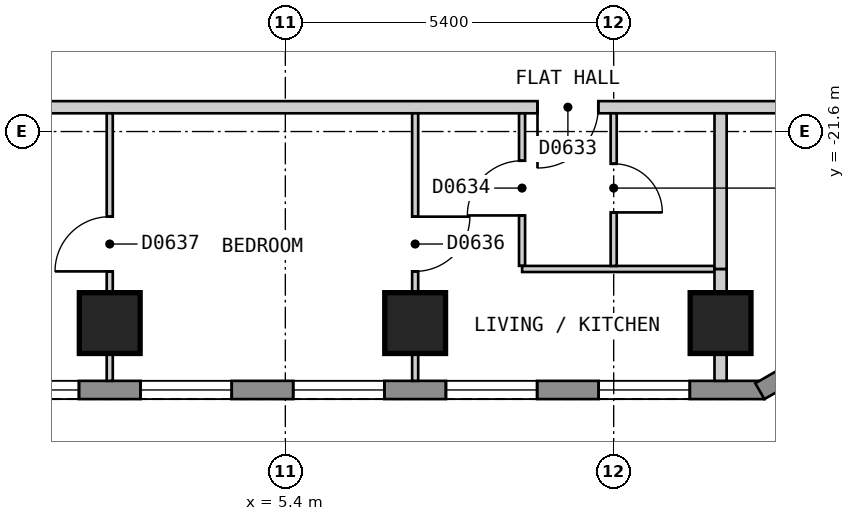
"""IFC4 building model, lengths in metres.
Left out: names, types, materials, properties, quantities, classifications, styles, units other than length and angle.
Written with IfcOpenShell. Run it as: python <this file> out.ifc"""

import sys

from ifc_helpers import new_model, si_unit, direction, frame, frame_2d, origin, origin_2d, place, context, subcontext, project, spatial, polyline, rectangle, outline, extrude, element, fill, save


model = new_model("IFC4")
c1 = context("Model", 3, precision=1e-05, world=origin(), true_north=direction((0.0, 1.0)))
c2 = subcontext(c1, "Body", "Model", "MODEL_VIEW")
j1 = project(units=[si_unit("LENGTHUNIT", "METRE"), si_unit("PLANEANGLEUNIT", "RADIAN")], contexts=[c1])
p1 = place(None, origin())
s1 = spatial("IfcSite", under=j1, at=p1, CompositionType="ELEMENT")
p2 = place(p1, origin())
s2 = spatial("IfcBuilding", under=s1, at=p2, CompositionType="ELEMENT")
p3 = place(p2, frame((0.0, 0.0, 81.0)))
s3 = spatial("IfcBuildingStorey", under=s2, at=p3, CompositionType="ELEMENT", Elevation=81.0)
for number, where, z_axis, x_axis in (
    (1, (2.512, -24.75, 0.0), (0.0, 0.0, 1.0), (1.0, 0.0, 0.0)),
    (2, (7.535, -24.75, 0.0), (0.0, 0.0, 1.0), (1.0, 0.0, 0.0)),
    (3, (12.558, -24.75, 0.0), (0.0, 0.0, 1.0), (1.0, 0.0, 0.0)),
):
    element("IfcColumn", number, at=place(p3, frame(where, z_axis=z_axis, x_axis=x_axis)), inside=s3, PredefinedType="COLUMN", context=c2, shape_type="SweptSolid", body=[
        extrude(rectangle(XDim=1.0, YDim=1.0, at=origin_2d()), origin(), (0.0, 0.0, 1.0), 3.0),
    ])
p4 = place(p3, frame((-13.279, -25.85, 0.0), z_axis=(0.0, 0.0, 1.0), x_axis=(1.0, 0.0, 0.0)))
e4 = element("IfcWall", 4, at=p4, inside=s3, PredefinedType="SOLIDWALL", context=c2, shape_type="SweptSolid", body=[
    extrude(outline(polyline([(0.0, -0.15), (26.558, -0.15), (26.478, 0.15), (0.08, 0.15), (0.0, -0.15)])), origin(), (0.0, 0.0, 1.0), 2.7),
])
p5 = place(p4, frame((1.228, 0.0, 0.15)))
e5 = element("IfcOpeningElement", 5, at=p5, cuts=e4, PredefinedType="OPENING", context=c2, shape_type="SweptSolid", body=[
    extrude(rectangle(XDim=1.5, YDim=2.1, at=frame_2d((0.75, 1.05))), frame((0.0, 0.16, 0.0), z_axis=(0.0, -1.0, 0.0), x_axis=(1.0, 0.0, 0.0)), (0.0, 0.0, 1.0), 0.32),
])
p6 = place(p4, frame((3.739, 0.0, 0.15)))
e6 = element("IfcOpeningElement", 6, at=p6, cuts=e4, PredefinedType="OPENING", context=c2, shape_type="SweptSolid", body=[
    extrude(rectangle(XDim=1.5, YDim=2.1, at=frame_2d((0.75, 1.05))), frame((0.0, 0.16, 0.0), z_axis=(0.0, -1.0, 0.0), x_axis=(1.0, 0.0, 0.0)), (0.0, 0.0, 1.0), 0.32),
])
p7 = place(p4, frame((6.251, 0.0, 0.15)))
e7 = element("IfcOpeningElement", 7, at=p7, cuts=e4, PredefinedType="OPENING", context=c2, shape_type="SweptSolid", body=[
    extrude(rectangle(XDim=1.5, YDim=2.1, at=frame_2d((0.75, 1.05))), frame((0.0, 0.16, 0.0), z_axis=(0.0, -1.0, 0.0), x_axis=(1.0, 0.0, 0.0)), (0.0, 0.0, 1.0), 0.32),
])
p8 = place(p4, frame((8.762, 0.0, 0.15)))
e8 = element("IfcOpeningElement", 8, at=p8, cuts=e4, PredefinedType="OPENING", context=c2, shape_type="SweptSolid", body=[
    extrude(rectangle(XDim=1.5, YDim=2.1, at=frame_2d((0.75, 1.05))), frame((0.0, 0.16, 0.0), z_axis=(0.0, -1.0, 0.0), x_axis=(1.0, 0.0, 0.0)), (0.0, 0.0, 1.0), 0.32),
])
p9 = place(p4, frame((11.274, 0.0, 0.15)))
e9 = element("IfcOpeningElement", 9, at=p9, cuts=e4, PredefinedType="OPENING", context=c2, shape_type="SweptSolid", body=[
    extrude(rectangle(XDim=1.5, YDim=2.1, at=frame_2d((0.75, 1.05))), frame((0.0, 0.16, 0.0), z_axis=(0.0, -1.0, 0.0), x_axis=(1.0, 0.0, 0.0)), (0.0, 0.0, 1.0), 0.32),
])
p10 = place(p4, frame((13.785, 0.0, 0.15)))
e10 = element("IfcOpeningElement", 10, at=p10, cuts=e4, PredefinedType="OPENING", context=c2, shape_type="SweptSolid", body=[
    extrude(rectangle(XDim=1.5, YDim=2.1, at=frame_2d((0.75, 1.05))), frame((0.0, 0.16, 0.0), z_axis=(0.0, -1.0, 0.0), x_axis=(1.0, 0.0, 0.0)), (0.0, 0.0, 1.0), 0.32),
])
p11 = place(p4, frame((16.297, 0.0, 0.15)))
e11 = element("IfcOpeningElement", 11, at=p11, cuts=e4, PredefinedType="OPENING", context=c2, shape_type="SweptSolid", body=[
    extrude(rectangle(XDim=1.5, YDim=2.1, at=frame_2d((0.75, 1.05))), frame((0.0, 0.16, 0.0), z_axis=(0.0, -1.0, 0.0), x_axis=(1.0, 0.0, 0.0)), (0.0, 0.0, 1.0), 0.32),
])
p12 = place(p4, frame((18.808, 0.0, 0.15)))
e12 = element("IfcOpeningElement", 12, at=p12, cuts=e4, PredefinedType="OPENING", context=c2, shape_type="SweptSolid", body=[
    extrude(rectangle(XDim=1.5, YDim=2.1, at=frame_2d((0.75, 1.05))), frame((0.0, 0.16, 0.0), z_axis=(0.0, -1.0, 0.0), x_axis=(1.0, 0.0, 0.0)), (0.0, 0.0, 1.0), 0.32),
])
p13 = place(p4, frame((21.32, 0.0, 0.15)))
e13 = element("IfcOpeningElement", 13, at=p13, cuts=e4, PredefinedType="OPENING", context=c2, shape_type="SweptSolid", body=[
    extrude(rectangle(XDim=1.5, YDim=2.1, at=frame_2d((0.75, 1.05))), frame((0.0, 0.16, 0.0), z_axis=(0.0, -1.0, 0.0), x_axis=(1.0, 0.0, 0.0)), (0.0, 0.0, 1.0), 0.32),
])
p14 = place(p4, frame((23.831, 0.0, 0.15)))
e14 = element("IfcOpeningElement", 14, at=p14, cuts=e4, PredefinedType="OPENING", context=c2, shape_type="SweptSolid", body=[
    extrude(rectangle(XDim=1.5, YDim=2.1, at=frame_2d((0.75, 1.05))), frame((0.0, 0.16, 0.0), z_axis=(0.0, -1.0, 0.0), x_axis=(1.0, 0.0, 0.0)), (0.0, 0.0, 1.0), 0.32),
])
p15 = place(p3, frame((13.204, -25.87, 0.0), z_axis=(0.0, 0.0, 1.0), x_axis=(0.866010750942, 0.50002537861, 0.0)))
e15 = element("IfcWall", 15, at=p15, inside=s3, PredefinedType="SOLIDWALL", context=c2, shape_type="SweptSolid", body=[
    extrude(outline(polyline([(0.0, -0.15), (5.0, -0.15), (4.919, 0.15), (0.08, 0.15), (0.0, -0.15)])), origin(), (0.0, 0.0, 1.0), 2.7),
])
p16 = place(p15, frame((0.65, 0.0, 0.15)))
e16 = element("IfcOpeningElement", 16, at=p16, cuts=e15, PredefinedType="OPENING", context=c2, shape_type="SweptSolid", body=[
    extrude(rectangle(XDim=1.2, YDim=2.1, at=frame_2d((0.6, 1.05))), frame((0.0, 0.16, 0.0), z_axis=(0.0, -1.0, 0.0), x_axis=(1.0, 0.0, 0.0)), (0.0, 0.0, 1.0), 0.32),
])
p17 = place(p15, frame((3.149, 0.0, 0.15)))
e17 = element("IfcOpeningElement", 17, at=p17, cuts=e15, PredefinedType="OPENING", context=c2, shape_type="SweptSolid", body=[
    extrude(rectangle(XDim=1.2, YDim=2.1, at=frame_2d((0.6, 1.05))), frame((0.0, 0.16, 0.0), z_axis=(0.0, -1.0, 0.0), x_axis=(1.0, 0.0, 0.0)), (0.0, 0.0, 1.0), 0.32),
])
p18 = place(p3, frame((-15.499, -21.2, 0.0), z_axis=(0.0, 0.0, 1.0), x_axis=(1.0, 0.0, 0.0)))
e18 = element("IfcWall", 18, at=p18, inside=s3, PredefinedType="PARTITIONING", context=c2, shape_type="SweptSolid", body=[
    extrude(rectangle(XDim=30.898, YDim=0.2, at=frame_2d((15.449, 0.0))), origin(), (0.0, 0.0, 1.0), 2.7),
])
p19 = place(p18, frame((4.954, 0.0, 0.0)))
e19 = element("IfcOpeningElement", 19, at=p19, cuts=e18, PredefinedType="OPENING", context=c2, shape_type="SweptSolid", body=[
    extrude(rectangle(XDim=1.0, YDim=2.1, at=frame_2d((0.5, 1.05))), frame((0.0, 0.11, 0.0), z_axis=(0.0, -1.0, 0.0), x_axis=(1.0, 0.0, 0.0)), (0.0, 0.0, 1.0), 0.22),
])
p20 = place(p18, frame((25.046, 0.0, 0.0)))
e20 = element("IfcOpeningElement", 20, at=p20, cuts=e18, PredefinedType="OPENING", context=c2, shape_type="SweptSolid", body=[
    extrude(rectangle(XDim=1.0, YDim=2.1, at=frame_2d((0.5, 1.05))), frame((0.0, 0.11, 0.0), z_axis=(0.0, -1.0, 0.0), x_axis=(1.0, 0.0, 0.0)), (0.0, 0.0, 1.0), 0.22),
])
p21 = place(p3, frame((9.293, -21.3, 0.0), z_axis=(0.0, 0.0, 1.0), x_axis=(0.0, -1.0, 0.0)))
e21 = element("IfcWall", 21, at=p21, inside=s3, PredefinedType="PARTITIONING", context=c2, shape_type="SweptSolid", body=[
    extrude(rectangle(XDim=2.509, YDim=0.1, at=frame_2d((1.254, 0.0))), origin(), (0.0, 0.0, 1.0), 2.7),
])
p22 = place(p21, frame((0.78, 0.0, 0.0)))
e22 = element("IfcOpeningElement", 22, at=p22, cuts=e21, PredefinedType="OPENING", context=c2, shape_type="SweptSolid", body=[
    extrude(rectangle(XDim=0.9, YDim=2.1, at=frame_2d((0.45, 1.05))), frame((0.0, 0.06, 0.0), z_axis=(0.0, -1.0, 0.0), x_axis=(1.0, 0.0, 0.0)), (0.0, 0.0, 1.0), 0.12),
])
p23 = place(p3, frame((9.294, -23.86, 0.0), z_axis=(0.0, 0.0, 1.0), x_axis=(1.0, 0.0, 0.0)))
e23 = element("IfcWall", 23, at=p23, inside=s3, PredefinedType="PARTITIONING", context=c2, shape_type="SweptSolid", body=[
    extrude(rectangle(XDim=3.164, YDim=0.1, at=frame_2d((1.582, 0.0))), origin(), (0.0, 0.0, 1.0), 2.7),
])
p24 = place(p3, frame((7.535, -25.7, 0.0), z_axis=(0.0, 0.0, 1.0), x_axis=(0.0, 1.0, 0.0)))
e24 = element("IfcWall", 24, at=p24, inside=s3, PredefinedType="PARTITIONING", context=c2, shape_type="SweptSolid", body=[
    extrude(rectangle(XDim=4.4, YDim=0.1, at=frame_2d((2.2, 0.0))), origin(), (0.0, 0.0, 1.0), 2.7),
])
p25 = place(p24, frame((1.8, 0.0, 0.0)))
e25 = element("IfcOpeningElement", 25, at=p25, cuts=e24, PredefinedType="OPENING", context=c2, shape_type="SweptSolid", body=[
    extrude(rectangle(XDim=0.9, YDim=2.1, at=frame_2d((0.45, 1.05))), frame((0.0, 0.06, 0.0), z_axis=(0.0, -1.0, 0.0), x_axis=(1.0, 0.0, 0.0)), (0.0, 0.0, 1.0), 0.12),
])
p26 = place(p3, frame((10.8, -23.81, 0.0), z_axis=(0.0, 0.0, 1.0), x_axis=(0.0, 1.0, 0.0)))
e26 = element("IfcWall", 26, at=p26, inside=s3, PredefinedType="PARTITIONING", context=c2, shape_type="SweptSolid", body=[
    extrude(rectangle(XDim=2.51, YDim=0.1, at=frame_2d((1.255, 0.0))), origin(), (0.0, 0.0, 1.0), 2.7),
])
p27 = place(p26, frame((0.88, 0.0, 0.0)))
e27 = element("IfcOpeningElement", 27, at=p27, cuts=e26, PredefinedType="OPENING", context=c2, shape_type="SweptSolid", body=[
    extrude(rectangle(XDim=0.8, YDim=2.1, at=frame_2d((0.4, 1.05))), frame((0.0, 0.06, 0.0), z_axis=(0.0, -1.0, 0.0), x_axis=(1.0, 0.0, 0.0)), (0.0, 0.0, 1.0), 0.12),
])
p28 = place(p3, frame((2.512, -25.7, 0.0), z_axis=(0.0, 0.0, 1.0), x_axis=(0.0, 1.0, 0.0)))
e28 = element("IfcWall", 28, at=p28, inside=s3, PredefinedType="PARTITIONING", context=c2, shape_type="SweptSolid", body=[
    extrude(rectangle(XDim=4.4, YDim=0.1, at=frame_2d((2.2, 0.0))), origin(), (0.0, 0.0, 1.0), 2.7),
])
p29 = place(p28, frame((1.8, 0.0, 0.0)))
e29 = element("IfcOpeningElement", 29, at=p29, cuts=e28, PredefinedType="OPENING", context=c2, shape_type="SweptSolid", body=[
    extrude(rectangle(XDim=0.9, YDim=2.1, at=frame_2d((0.45, 1.05))), frame((0.0, 0.06, 0.0), z_axis=(0.0, -1.0, 0.0), x_axis=(1.0, 0.0, 0.0)), (0.0, 0.0, 1.0), 0.12),
])
p30 = place(p3, frame((12.558, -23.86, 0.0), z_axis=(0.0, 0.0, 1.0), x_axis=(0.0, -1.0, 0.0)))
e30 = element("IfcWall", 30, at=p30, inside=s3, PredefinedType="PARTITIONING", context=c2, shape_type="SweptSolid", body=[
    extrude(rectangle(XDim=1.84, YDim=0.2, at=frame_2d((0.92, 0.0))), origin(), (0.0, 0.0, 1.0), 2.7),
])
p31 = place(p3, frame((12.558, -23.86, 0.0), z_axis=(0.0, 0.0, 1.0), x_axis=(0.0, 1.0, 0.0)))
e31 = element("IfcWall", 31, at=p31, inside=s3, PredefinedType="PARTITIONING", context=c2, shape_type="SweptSolid", body=[
    extrude(rectangle(XDim=2.56, YDim=0.2, at=frame_2d((1.28, 0.0))), origin(), (0.0, 0.0, 1.0), 2.7),
])
p32 = place(p10, origin())
e32 = element("IfcWindow", 32, at=p32, inside=s3, PartitioningType="SINGLE_PANEL", PredefinedType="WINDOW", context=c2, shape_type="SweptSolid", body=[
    extrude(rectangle(XDim=1.5, YDim=2.1, at=frame_2d((0.75, 1.05))), frame((0.0, 0.03, 0.0), z_axis=(0.0, -1.0, 0.0), x_axis=(1.0, 0.0, 0.0)), (0.0, 0.0, 1.0), 0.06),
])
fill(e10, e32)
p33 = place(p11, origin())
e33 = element("IfcWindow", 33, at=p33, inside=s3, PartitioningType="SINGLE_PANEL", PredefinedType="WINDOW", context=c2, shape_type="SweptSolid", body=[
    extrude(rectangle(XDim=1.5, YDim=2.1, at=frame_2d((0.75, 1.05))), frame((0.0, 0.03, 0.0), z_axis=(0.0, -1.0, 0.0), x_axis=(1.0, 0.0, 0.0)), (0.0, 0.0, 1.0), 0.06),
])
fill(e11, e33)
p34 = place(p12, origin())
e34 = element("IfcWindow", 34, at=p34, inside=s3, PartitioningType="SINGLE_PANEL", PredefinedType="WINDOW", context=c2, shape_type="SweptSolid", body=[
    extrude(rectangle(XDim=1.5, YDim=2.1, at=frame_2d((0.75, 1.05))), frame((0.0, 0.03, 0.0), z_axis=(0.0, -1.0, 0.0), x_axis=(1.0, 0.0, 0.0)), (0.0, 0.0, 1.0), 0.06),
])
fill(e12, e34)
p35 = place(p13, origin())
e35 = element("IfcWindow", 35, at=p35, inside=s3, PartitioningType="SINGLE_PANEL", PredefinedType="WINDOW", context=c2, shape_type="SweptSolid", body=[
    extrude(rectangle(XDim=1.5, YDim=2.1, at=frame_2d((0.75, 1.05))), frame((0.0, 0.03, 0.0), z_axis=(0.0, -1.0, 0.0), x_axis=(1.0, 0.0, 0.0)), (0.0, 0.0, 1.0), 0.06),
])
fill(e13, e35)
p36 = place(p14, origin())
e36 = element("IfcWindow", 36, at=p36, inside=s3, PartitioningType="SINGLE_PANEL", PredefinedType="WINDOW", context=c2, shape_type="SweptSolid", body=[
    extrude(rectangle(XDim=1.5, YDim=2.1, at=frame_2d((0.75, 1.05))), frame((0.0, 0.03, 0.0), z_axis=(0.0, -1.0, 0.0), x_axis=(1.0, 0.0, 0.0)), (0.0, 0.0, 1.0), 0.06),
])
fill(e14, e36)
p37 = place(p20, origin())
e37 = element("IfcDoor", 37, at=p37, inside=s3, OperationType="SINGLE_SWING_LEFT", PredefinedType="DOOR", context=c2, shape_type="SweptSolid", body=[
    extrude(rectangle(XDim=1.0, YDim=2.1, at=frame_2d((0.5, 1.05))), frame((0.0, 0.025, 0.0), z_axis=(0.0, -1.0, 0.0), x_axis=(1.0, 0.0, 0.0)), (0.0, 0.0, 1.0), 0.05),
])
fill(e20, e37)
p38 = place(p22, origin())
e38 = element("IfcDoor", 38, at=p38, inside=s3, OperationType="SINGLE_SWING_RIGHT", PredefinedType="DOOR", context=c2, shape_type="SweptSolid", body=[
    extrude(rectangle(XDim=0.9, YDim=2.1, at=frame_2d((0.45, 1.05))), frame((0.0, 0.025, 0.0), z_axis=(0.0, -1.0, 0.0), x_axis=(1.0, 0.0, 0.0)), (0.0, 0.0, 1.0), 0.05),
])
fill(e22, e38)
p39 = place(p27, origin())
e39 = element("IfcDoor", 39, at=p39, inside=s3, OperationType="SINGLE_SWING_LEFT", PredefinedType="DOOR", context=c2, shape_type="SweptSolid", body=[
    extrude(rectangle(XDim=0.8, YDim=2.1, at=frame_2d((0.4, 1.05))), frame((0.0, 0.025, 0.0), z_axis=(0.0, -1.0, 0.0), x_axis=(1.0, 0.0, 0.0)), (0.0, 0.0, 1.0), 0.05),
])
fill(e27, e39)
p40 = place(p25, origin())
e40 = element("IfcDoor", 40, at=p40, inside=s3, OperationType="SINGLE_SWING_RIGHT", PredefinedType="DOOR", context=c2, shape_type="SweptSolid", body=[
    extrude(rectangle(XDim=0.9, YDim=2.1, at=frame_2d((0.45, 1.05))), frame((0.0, 0.025, 0.0), z_axis=(0.0, -1.0, 0.0), x_axis=(1.0, 0.0, 0.0)), (0.0, 0.0, 1.0), 0.05),
])
fill(e25, e40)
p41 = place(p29, origin())
e41 = element("IfcDoor", 41, at=p41, inside=s3, OperationType="SINGLE_SWING_LEFT", PredefinedType="DOOR", context=c2, shape_type="SweptSolid", body=[
    extrude(rectangle(XDim=0.9, YDim=2.1, at=frame_2d((0.45, 1.05))), frame((0.0, 0.025, 0.0), z_axis=(0.0, -1.0, 0.0), x_axis=(1.0, 0.0, 0.0)), (0.0, 0.0, 1.0), 0.05),
])
fill(e29, e41)
save(model, sys.argv[1])
